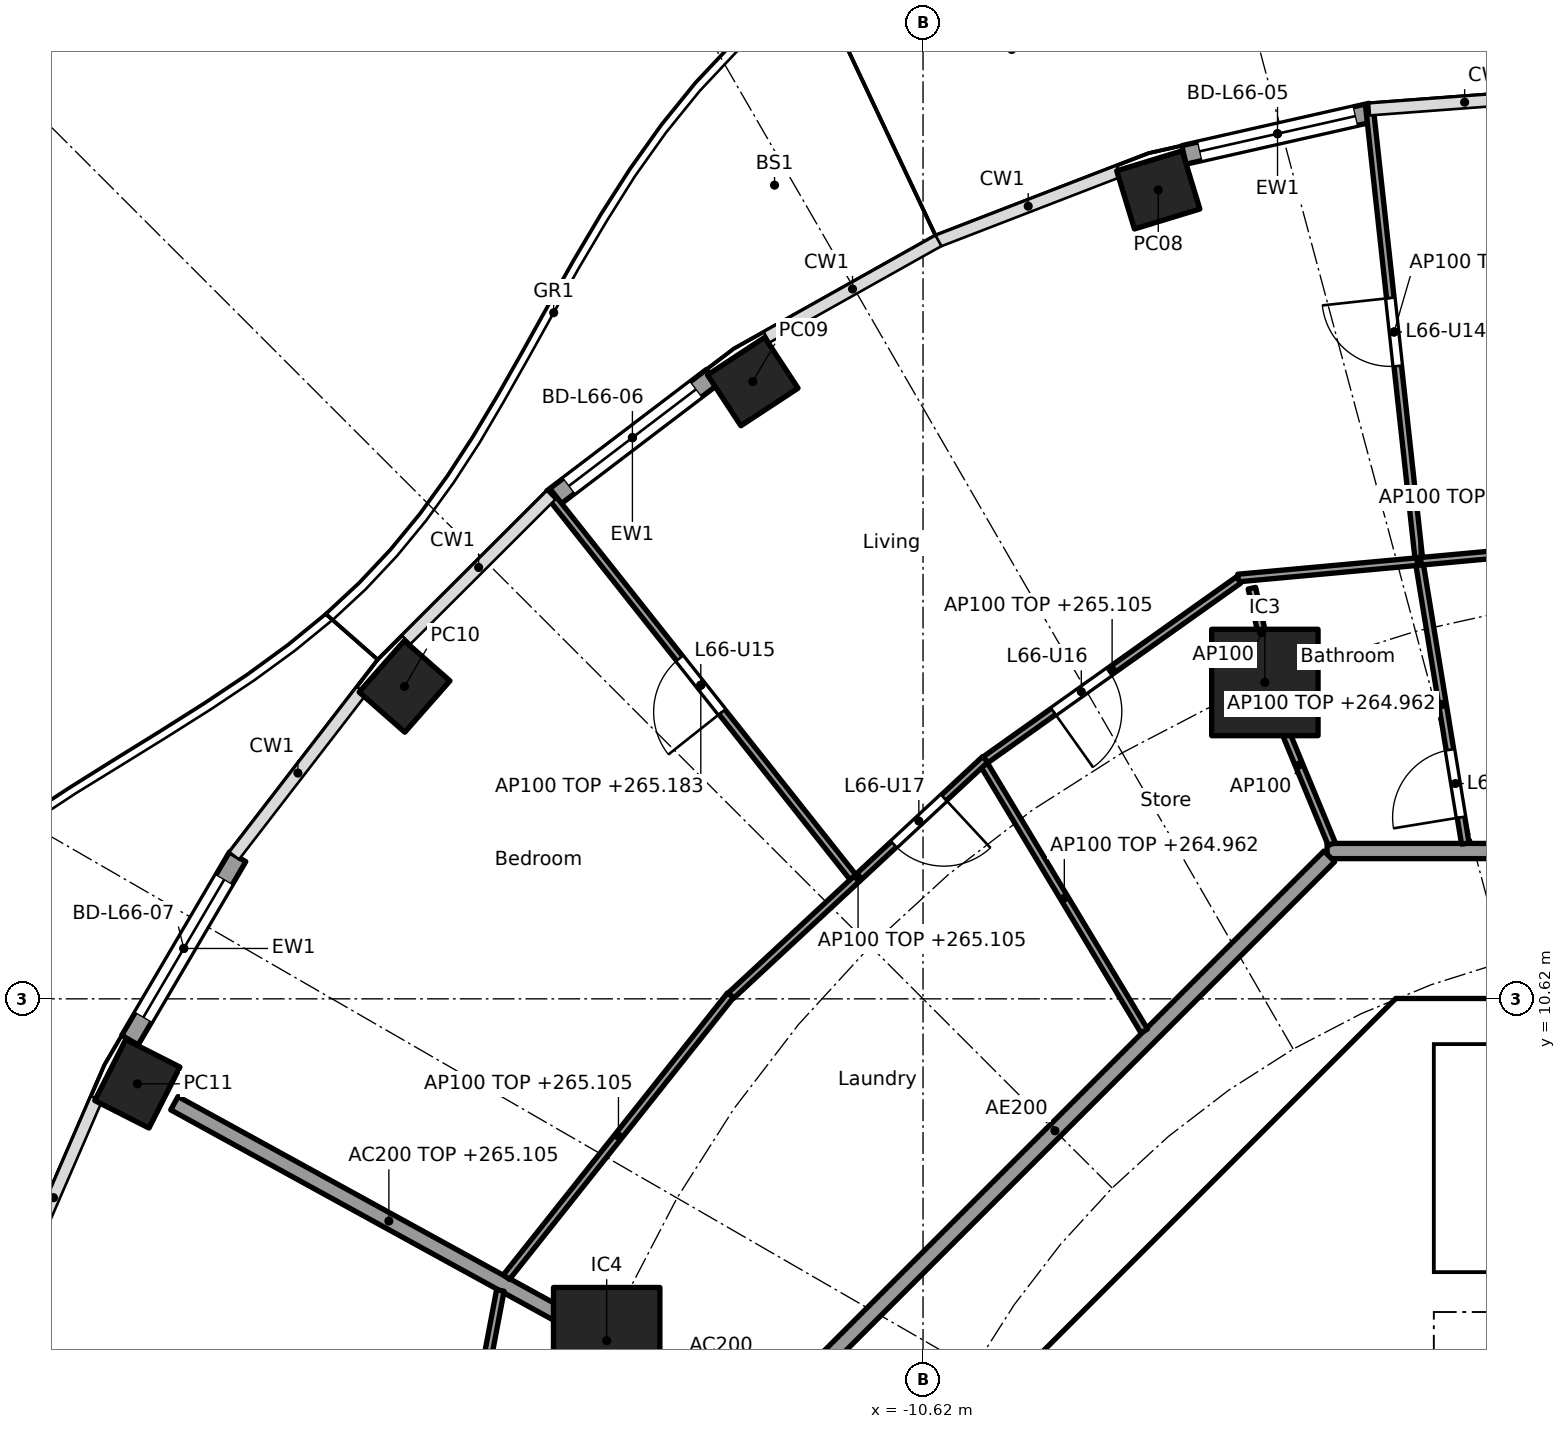
"""IFC4 building model, lengths in metres.
Left out: names, types, materials, properties, quantities, classifications, styles, units other than length and angle.
Written with IfcOpenShell. Run it as: python <this file> out.ifc"""

import sys

from ifc_helpers import new_model, si_unit, direction, frame, frame_2d, origin, origin_2d, place, context, subcontext, project, spatial, polyline, rectangle, hollow_rectangle, outline, extrude, element, fill, save


model = new_model("IFC4")
c1 = context("Model", 3, precision=1e-05, world=origin(), true_north=direction((0.0, 1.0)))
c2 = subcontext(c1, "Body", "Model", "MODEL_VIEW")
j1 = project(units=[si_unit("LENGTHUNIT", "METRE"), si_unit("PLANEANGLEUNIT", "RADIAN")], contexts=[c1])
p1 = place(None, origin())
s1 = spatial("IfcSite", under=j1, at=p1, CompositionType="ELEMENT")
p2 = place(p1, origin())
s2 = spatial("IfcBuilding", under=s1, at=p2, CompositionType="ELEMENT")
p3 = place(p2, frame((0.0, 0.0, 262.2)))
s3 = spatial("IfcBuildingStorey", under=s2, at=p3, CompositionType="ELEMENT", Elevation=262.2)
for number, where, z_axis, x_axis in (
    (1, (-7.525, 21.262, 0.0), (0.0, 0.0, 1.0), (-0.957, -0.292, 0.0)),
    (2, (-12.86, 18.741, 0.0), (0.0, 0.0, 1.0), (-0.836, -0.549, 0.0)),
    (3, (-17.441, 14.73, 0.0), (0.0, 0.0, 1.0), (-0.66, -0.751, 0.0)),
    (4, (-20.957, 9.502, 0.0), (0.0, 0.0, 1.0), (-0.452, -0.892, 0.0)),
):
    element("IfcColumn", number, at=place(p3, frame(where, z_axis=z_axis, x_axis=x_axis)), inside=s3, PredefinedType="COLUMN", context=c2, shape_type="SweptSolid", body=[
        extrude(hollow_rectangle(XDim=0.9, YDim=0.8, WallThickness=0.028, at=origin_2d()), origin(), (0.0, 0.0, 1.0), 3.7),
    ])
for number, where, z_axis, x_axis in (
    (5, (-6.123, 14.782, 0.0), (0.0, 0.0, 1.0), (1.0, 0.0, 0.0)),
    (6, (-14.782, 6.123, 0.0), (0.0, 0.0, 1.0), (1.0, 0.0, 0.0)),
):
    element("IfcColumn", number, at=place(p3, frame(where, z_axis=z_axis, x_axis=x_axis)), inside=s3, PredefinedType="COLUMN", context=c2, shape_type="SweptSolid", body=[
        extrude(rectangle(XDim=1.4, YDim=1.4, at=origin_2d()), origin(), (0.0, 0.0, 1.0), 3.7),
    ])
p4 = place(p3, frame((-7.188, 21.723, 0.0), z_axis=(0.0, 0.0, 1.0), x_axis=(0.975319584032, 0.220797891756, 0.0)))
e7 = element("IfcWall", 7, at=p4, inside=s3, PredefinedType="SOLIDWALL", context=c2, shape_type="SweptSolid", body=[
    extrude(rectangle(XDim=2.525, YDim=0.25, at=frame_2d((1.263, 0.0))), origin(), (0.0, 0.0, 1.0), 3.44),
])
p5 = place(p4, frame((0.213, 0.0, 0.0)))
e8 = element("IfcOpeningElement", 8, at=p5, cuts=e7, PredefinedType="OPENING", context=c2, shape_type="SweptSolid", body=[
    extrude(rectangle(XDim=2.1, YDim=2.4, at=frame_2d((1.05, 1.2))), frame((0.0, 0.135, 0.0), z_axis=(0.0, -1.0, 0.0), x_axis=(1.0, 0.0, 0.0)), (0.0, 0.0, 1.0), 0.27),
])
p6 = place(p3, frame((-15.495, 17.204, 0.0), z_axis=(0.0, 0.0, 1.0), x_axis=(0.796010739377, 0.605282498339, 0.0)))
e9 = element("IfcWall", 9, at=p6, inside=s3, PredefinedType="SOLIDWALL", context=c2, shape_type="SweptSolid", body=[
    extrude(rectangle(XDim=2.641, YDim=0.25, at=frame_2d((1.32, 0.0))), origin(), (0.0, 0.0, 1.0), 3.44),
])
p7 = place(p6, frame((0.27, 0.0, 0.0)))
e10 = element("IfcOpeningElement", 10, at=p7, cuts=e9, PredefinedType="OPENING", context=c2, shape_type="SweptSolid", body=[
    extrude(rectangle(XDim=2.1, YDim=2.4, at=frame_2d((1.05, 1.2))), frame((0.0, 0.135, 0.0), z_axis=(0.0, -1.0, 0.0), x_axis=(1.0, 0.0, 0.0)), (0.0, 0.0, 1.0), 0.27),
])
p8 = place(p3, frame((-21.054, 10.077, 0.0), z_axis=(0.0, 0.0, 1.0), x_axis=(0.506371364425, 0.862315511452, 0.0)))
e11 = element("IfcWall", 11, at=p8, inside=s3, PredefinedType="SOLIDWALL", context=c2, shape_type="SweptSolid", body=[
    extrude(rectangle(XDim=2.796, YDim=0.25, at=frame_2d((1.398, 0.0))), origin(), (0.0, 0.0, 1.0), 3.44),
])
p9 = place(p8, frame((0.348, 0.0, 0.0)))
e12 = element("IfcOpeningElement", 12, at=p9, cuts=e11, PredefinedType="OPENING", context=c2, shape_type="SweptSolid", body=[
    extrude(rectangle(XDim=2.1, YDim=2.4, at=frame_2d((1.05, 1.2))), frame((0.0, 0.135, 0.0), z_axis=(0.0, -1.0, 0.0), x_axis=(1.0, 0.0, 0.0)), (0.0, 0.0, 1.0), 0.27),
])
p10 = place(p3, frame((-4.613, 9.988, 0.0), z_axis=(0.0, 0.0, 1.0), x_axis=(-0.707106781187, -0.707106781187, 0.0)))
e13 = element("IfcWall", 13, at=p10, inside=s3, PredefinedType="SHEAR", context=c2, shape_type="SweptSolid", body=[
    extrude(rectangle(XDim=7.602, YDim=0.6, at=frame_2d((3.801, 0.0))), origin(), (0.0, 0.0, 1.0), 3.44),
])
p11 = place(p10, frame((0.351, 0.0, 0.0)))
e14 = element("IfcOpeningElement", 14, at=p11, cuts=e13, PredefinedType="OPENING", context=c2, shape_type="SweptSolid", body=[
    extrude(rectangle(XDim=1.1, YDim=2.1, at=frame_2d((0.55, 1.05))), frame((0.0, 0.31, 0.0), z_axis=(0.0, -1.0, 0.0), x_axis=(1.0, 0.0, 0.0)), (0.0, 0.0, 1.0), 0.62),
])
p12 = place(p3, frame((-5.8, 4.3, 0.0), z_axis=(0.0, 0.0, 1.0), x_axis=(0.0, 1.0, 0.0)))
e15 = element("IfcWall", 15, at=p12, inside=s3, PredefinedType="PARTITIONING", context=c2, shape_type="SweptSolid", body=[
    extrude(rectangle(XDim=3.927, YDim=0.15, at=frame_2d((1.963, 0.0))), origin(), (0.0, 0.0, 1.0), 3.44),
])
p13 = place(p12, frame((1.551, 0.0, 0.0)))
e16 = element("IfcOpeningElement", 16, at=p13, cuts=e15, PredefinedType="OPENING", context=c2, shape_type="SweptSolid", body=[
    extrude(rectangle(XDim=0.9, YDim=2.1, at=frame_2d((0.45, 1.05))), frame((0.0, 0.085, 0.0), z_axis=(0.0, -1.0, 0.0), x_axis=(1.0, 0.0, 0.0)), (0.0, 0.0, 1.0), 0.17),
])
p14 = place(p3, frame((-4.0, 4.3, 0.0), z_axis=(0.0, 0.0, 1.0), x_axis=(0.0, 1.0, 0.0)))
e17 = element("IfcWall", 17, at=p14, inside=s3, PredefinedType="SOLIDWALL", context=c2, shape_type="SweptSolid", body=[
    extrude(rectangle(XDim=2.2, YDim=0.2, at=frame_2d((1.1, 0.0))), origin(), (0.0, 0.0, 1.0), 3.44),
])
p15 = place(p14, frame((0.55, 0.0, 0.0)))
e18 = element("IfcOpeningElement", 18, at=p15, cuts=e17, PredefinedType="OPENING", context=c2, shape_type="SweptSolid", body=[
    extrude(rectangle(XDim=1.1, YDim=2.1, at=frame_2d((0.55, 1.05))), frame((0.0, 0.11, 0.0), z_axis=(0.0, -1.0, 0.0), x_axis=(1.0, 0.0, 0.0)), (0.0, 0.0, 1.0), 0.22),
])
p16 = place(p3, origin())
e19 = element("IfcWall", 19, at=p16, inside=s3, PredefinedType="SHEAR", context=c2, shape_type="SweptSolid", body=[
    extrude(outline(polyline([(-4.152, 10.025), (-4.401, 9.776), (-4.825, 10.2), (-4.401, 10.625), (4.401, 10.625), (4.825, 10.2), (4.401, 9.776), (4.152, 10.025), (-4.152, 10.025)])), origin(), (0.0, 0.0, 1.0), 3.44),
])
p17 = place(p3, origin())
e20 = element("IfcWall", 20, at=p17, inside=s3, PredefinedType="SOLIDWALL", context=c2, shape_type="SweptSolid", body=[
    extrude(outline(polyline([(-3.9, 7.025), (-4.1, 7.025), (-4.1, 10.025), (-3.9, 10.025), (-3.9, 7.025)])), origin(), (0.0, 0.0, 1.0), 3.44),
])
p18 = place(p3, origin())
e21 = element("IfcWall", 21, at=p18, inside=s3, PredefinedType="SOLIDWALL", context=c2, shape_type="SweptSolid", body=[
    extrude(outline(polyline([(4.1, 6.5), (-4.1, 6.5), (-4.1, 7.025), (4.1, 7.025), (4.1, 6.5)])), origin(), (0.0, 0.0, 1.0), 3.44),
])
p19 = place(p3, frame((-12.657, 5.243, 0.0), z_axis=(0.0, 0.0, 1.0), x_axis=(-0.923869415315, 0.382707856524, 0.0)))
e22 = element("IfcWall", 22, at=p19, inside=s3, PredefinedType="PARTITIONING", context=c2, shape_type="SweptSolid", body=[
    extrude(rectangle(XDim=2.2, YDim=0.2, at=frame_2d((1.1, 0.0))), origin(), (0.0, 0.0, 1.0), 3.44),
])
p20 = place(p3, frame((-14.826, 6.147, 0.0), z_axis=(0.0, 0.0, 1.0), x_axis=(-0.876484755865, 0.481429613481, 0.0)))
e23 = element("IfcWall", 23, at=p20, inside=s3, PredefinedType="PARTITIONING", context=c2, shape_type="SweptSolid", body=[
    extrude(rectangle(XDim=6.439, YDim=0.2, at=frame_2d((3.219, 0.0))), origin(), (0.0, 0.0, 1.0), 2.905),
])
p21 = place(p3, frame((5.104, 12.565, 0.0), z_axis=(0.0, 0.0, 1.0), x_axis=(-1.0, 0.0, 0.0)))
e24 = element("IfcWall", 24, at=p21, inside=s3, PredefinedType="PARTITIONING", context=c2, shape_type="SweptSolid", body=[
    extrude(rectangle(XDim=10.409, YDim=0.2, at=frame_2d((5.205, 0.0))), origin(), (0.0, 0.0, 1.0), 3.44),
])
p22 = place(p21, frame((6.339, 0.0, 0.0)))
e25 = element("IfcOpeningElement", 25, at=p22, cuts=e24, PredefinedType="OPENING", context=c2, shape_type="SweptSolid", body=[
    extrude(rectangle(XDim=1.0, YDim=2.1, at=frame_2d((0.5, 1.05))), frame((0.0, 0.11, 0.0), z_axis=(0.0, -1.0, 0.0), x_axis=(1.0, 0.0, 0.0)), (0.0, 0.0, 1.0), 0.22),
])
p23 = place(p3, frame((-5.275, 12.494, 0.0), z_axis=(0.0, 0.0, 1.0), x_axis=(-0.707106781187, -0.707106781187, 0.0)))
e26 = element("IfcWall", 26, at=p23, inside=s3, PredefinedType="PARTITIONING", context=c2, shape_type="SweptSolid", body=[
    extrude(rectangle(XDim=10.209, YDim=0.2, at=frame_2d((5.104, 0.0))), origin(), (0.0, 0.0, 1.0), 3.44),
])
p24 = place(p3, frame((-1.711, 16.592, 0.0), z_axis=(0.0, 0.0, 1.0), x_axis=(-0.995843707015, -0.091078599017, 0.0)))
e27 = element("IfcWall", 27, at=p24, inside=s3, PredefinedType="PARTITIONING", context=c2, shape_type="SweptSolid", body=[
    extrude(rectangle(XDim=4.785, YDim=0.1, at=frame_2d((2.392, 0.0))), origin(), (0.0, 0.0, 1.0), 2.905),
])
p25 = place(p3, frame((-3.486, 12.663, 0.0), z_axis=(0.0, 0.0, 1.0), x_axis=(-0.161602751674, 0.986855891532, 0.0)))
e28 = element("IfcWall", 28, at=p25, inside=s3, PredefinedType="PARTITIONING", context=c2, shape_type="SweptSolid", body=[
    extrude(rectangle(XDim=3.71, YDim=0.1, at=frame_2d((1.855, 0.0))), origin(), (0.0, 0.0, 1.0), 2.762),
])
p26 = place(p25, frame((0.35, 0.0, 0.0)))
e29 = element("IfcOpeningElement", 29, at=p26, cuts=e28, PredefinedType="OPENING", context=c2, shape_type="SweptSolid", body=[
    extrude(rectangle(XDim=0.9, YDim=2.1, at=frame_2d((0.45, 1.05))), frame((0.0, 0.06, 0.0), z_axis=(0.0, -1.0, 0.0), x_axis=(1.0, 0.0, 0.0)), (0.0, 0.0, 1.0), 0.12),
])
p27 = place(p3, frame((-4.099, 16.424, 0.0), z_axis=(0.0, 0.0, 1.0), x_axis=(-0.10867295252, 0.99407755703, 0.0)))
e30 = element("IfcWall", 30, at=p27, inside=s3, PredefinedType="PARTITIONING", context=c2, shape_type="SweptSolid", body=[
    extrude(rectangle(XDim=5.974, YDim=0.1, at=frame_2d((2.987, 0.0))), origin(), (0.0, 0.0, 1.0), 2.983),
])
p28 = place(p27, frame((2.537, 0.0, 0.0)))
e31 = element("IfcOpeningElement", 31, at=p28, cuts=e30, PredefinedType="OPENING", context=c2, shape_type="SweptSolid", body=[
    extrude(rectangle(XDim=0.9, YDim=2.1, at=frame_2d((0.45, 1.05))), frame((0.0, 0.06, 0.0), z_axis=(0.0, -1.0, 0.0), x_axis=(1.0, 0.0, 0.0)), (0.0, 0.0, 1.0), 0.12),
])
p29 = place(p3, frame((-5.243, 12.657, 0.0), z_axis=(0.0, 0.0, 1.0), x_axis=(-0.382719158442, 0.923864733477, 0.0)))
e32 = element("IfcWall", 32, at=p29, inside=s3, PredefinedType="PARTITIONING", context=c2, shape_type="SweptSolid", body=[
    extrude(rectangle(XDim=2.25, YDim=0.1, at=frame_2d((1.125, 0.0))), origin(), (0.0, 0.0, 1.0), 3.44),
])
p30 = place(p3, frame((-6.467, 16.132, 0.0), z_axis=(0.0, 0.0, 1.0), x_axis=(-0.815192286069, -0.579190414919, 0.0)))
e33 = element("IfcWall", 33, at=p30, inside=s3, PredefinedType="PARTITIONING", context=c2, shape_type="SweptSolid", body=[
    extrude(rectangle(XDim=4.086, YDim=0.1, at=frame_2d((2.043, 0.0))), origin(), (0.0, 0.0, 1.0), 2.905),
])
p31 = place(p30, frame((2.09, 0.0, 0.0)))
e34 = element("IfcOpeningElement", 34, at=p31, cuts=e33, PredefinedType="OPENING", context=c2, shape_type="SweptSolid", body=[
    extrude(rectangle(XDim=0.9, YDim=2.1, at=frame_2d((0.45, 1.05))), frame((0.0, 0.06, 0.0), z_axis=(0.0, -1.0, 0.0), x_axis=(1.0, 0.0, 0.0)), (0.0, 0.0, 1.0), 0.12),
])
p32 = place(p3, frame((-7.709, 10.197, 0.0), z_axis=(0.0, 0.0, 1.0), x_axis=(-0.515524871668, 0.856874615502, 0.0)))
e35 = element("IfcWall", 35, at=p32, inside=s3, PredefinedType="PARTITIONING", context=c2, shape_type="SweptSolid", body=[
    extrude(rectangle(XDim=4.08, YDim=0.1, at=frame_2d((2.04, 0.0))), origin(), (0.0, 0.0, 1.0), 2.762),
])
p33 = place(p3, frame((-9.802, 13.77, 0.0), z_axis=(0.0, 0.0, 1.0), x_axis=(-0.732662099478, -0.680592571212, 0.0)))
e36 = element("IfcWall", 36, at=p33, inside=s3, PredefinedType="PARTITIONING", context=c2, shape_type="SweptSolid", body=[
    extrude(rectangle(XDim=4.567, YDim=0.1, at=frame_2d((2.283, 0.0))), origin(), (0.0, 0.0, 1.0), 2.905),
])
p34 = place(p33, frame((0.742, 0.0, 0.0)))
e37 = element("IfcOpeningElement", 37, at=p34, cuts=e36, PredefinedType="OPENING", context=c2, shape_type="SweptSolid", body=[
    extrude(rectangle(XDim=0.9, YDim=2.1, at=frame_2d((0.45, 1.05))), frame((0.0, 0.06, 0.0), z_axis=(0.0, -1.0, 0.0), x_axis=(1.0, 0.0, 0.0)), (0.0, 0.0, 1.0), 0.12),
])
p35 = place(p3, frame((-11.543, 12.221, 0.0), z_axis=(0.0, 0.0, 1.0), x_axis=(-0.621117202271, 0.783717692185, 0.0)))
e38 = element("IfcWall", 38, at=p35, inside=s3, PredefinedType="PARTITIONING", context=c2, shape_type="SweptSolid", body=[
    extrude(rectangle(XDim=6.444, YDim=0.1, at=frame_2d((3.222, 0.0))), origin(), (0.0, 0.0, 1.0), 2.983),
])
p36 = place(p35, frame((2.772, 0.0, 0.0)))
e39 = element("IfcOpeningElement", 39, at=p36, cuts=e38, PredefinedType="OPENING", context=c2, shape_type="SweptSolid", body=[
    extrude(rectangle(XDim=0.9, YDim=2.1, at=frame_2d((0.45, 1.05))), frame((0.0, 0.06, 0.0), z_axis=(0.0, -1.0, 0.0), x_axis=(1.0, 0.0, 0.0)), (0.0, 0.0, 1.0), 0.12),
])
p37 = place(p3, frame((-13.154, 10.667, 0.0), z_axis=(0.0, 0.0, 1.0), x_axis=(-0.622246555556, -0.782821323227, 0.0)))
e40 = element("IfcWall", 40, at=p37, inside=s3, PredefinedType="PARTITIONING", context=c2, shape_type="SweptSolid", body=[
    extrude(rectangle(XDim=4.736, YDim=0.1, at=frame_2d((2.368, 0.0))), origin(), (0.0, 0.0, 1.0), 2.905),
])
p38 = place(p3, frame((-16.181, 6.783, 0.0), z_axis=(0.0, 0.0, 1.0), x_axis=(-0.185670583745, -0.982612046706, 0.0)))
e41 = element("IfcWall", 41, at=p38, inside=s3, PredefinedType="PARTITIONING", context=c2, shape_type="SweptSolid", body=[
    extrude(rectangle(XDim=4.351, YDim=0.1, at=frame_2d((2.176, 0.0))), origin(), (0.0, 0.0, 1.0), 2.905),
])
p39 = place(p38, frame((1.726, 0.0, 0.0)))
e42 = element("IfcOpeningElement", 42, at=p39, cuts=e41, PredefinedType="OPENING", context=c2, shape_type="SweptSolid", body=[
    extrude(rectangle(XDim=0.9, YDim=2.1, at=frame_2d((0.45, 1.05))), frame((0.0, 0.06, 0.0), z_axis=(0.0, -1.0, 0.0), x_axis=(1.0, 0.0, 0.0)), (0.0, 0.0, 1.0), 0.12),
])
p40 = place(p3, frame((-6.036, 14.853, 0.0), z_axis=(0.0, 0.0, 1.0), x_axis=(-0.215009518078, 0.976611953202, 0.0)))
e43 = element("IfcWall", 43, at=p40, inside=s3, PredefinedType="PARTITIONING", context=c2, shape_type="SweptSolid", body=[
    extrude(rectangle(XDim=1.198, YDim=0.1, at=frame_2d((0.599, 0.0))), origin(), (0.0, 0.0, 1.0), 3.44),
])
p41 = place(p5, origin())
e44 = element("IfcDoor", 44, at=p41, inside=s3, OperationType="SLIDING_TO_LEFT", PredefinedType="DOOR", context=c2, shape_type="SweptSolid", body=[
    extrude(rectangle(XDim=2.1, YDim=2.4, at=frame_2d((1.05, 1.2))), frame((0.0, 0.025, 0.0), z_axis=(0.0, -1.0, 0.0), x_axis=(1.0, 0.0, 0.0)), (0.0, 0.0, 1.0), 0.05),
])
fill(e8, e44)
p42 = place(p7, origin())
e45 = element("IfcDoor", 45, at=p42, inside=s3, OperationType="SLIDING_TO_LEFT", PredefinedType="DOOR", context=c2, shape_type="SweptSolid", body=[
    extrude(rectangle(XDim=2.1, YDim=2.4, at=frame_2d((1.05, 1.2))), frame((0.0, 0.025, 0.0), z_axis=(0.0, -1.0, 0.0), x_axis=(1.0, 0.0, 0.0)), (0.0, 0.0, 1.0), 0.05),
])
fill(e10, e45)
p43 = place(p9, origin())
e46 = element("IfcDoor", 46, at=p43, inside=s3, OperationType="SLIDING_TO_LEFT", PredefinedType="DOOR", context=c2, shape_type="SweptSolid", body=[
    extrude(rectangle(XDim=2.1, YDim=2.4, at=frame_2d((1.05, 1.2))), frame((0.0, 0.025, 0.0), z_axis=(0.0, -1.0, 0.0), x_axis=(1.0, 0.0, 0.0)), (0.0, 0.0, 1.0), 0.05),
])
fill(e12, e46)
p44 = place(p13, origin())
e47 = element("IfcDoor", 47, at=p44, inside=s3, OperationType="SINGLE_SWING_LEFT", PredefinedType="DOOR", context=c2, shape_type="SweptSolid", body=[
    extrude(rectangle(XDim=0.9, YDim=2.1, at=frame_2d((0.45, 1.05))), frame((0.0, 0.025, 0.0), z_axis=(0.0, -1.0, 0.0), x_axis=(1.0, 0.0, 0.0)), (0.0, 0.0, 1.0), 0.05),
])
fill(e16, e47)
p45 = place(p11, origin())
e48 = element("IfcDoor", 48, at=p45, inside=s3, OperationType="SINGLE_SWING_RIGHT", PredefinedType="DOOR", context=c2, shape_type="SweptSolid", body=[
    extrude(rectangle(XDim=1.1, YDim=2.1, at=frame_2d((0.55, 1.05))), frame((0.0, 0.025, 0.0), z_axis=(0.0, -1.0, 0.0), x_axis=(1.0, 0.0, 0.0)), (0.0, 0.0, 1.0), 0.05),
])
fill(e14, e48)
p46 = place(p26, origin())
e49 = element("IfcDoor", 49, at=p46, inside=s3, OperationType="SINGLE_SWING_LEFT", PredefinedType="DOOR", context=c2, shape_type="SweptSolid", body=[
    extrude(rectangle(XDim=0.9, YDim=2.1, at=frame_2d((0.45, 1.05))), frame((0.0, 0.025, 0.0), z_axis=(0.0, -1.0, 0.0), x_axis=(1.0, 0.0, 0.0)), (0.0, 0.0, 1.0), 0.05),
])
fill(e29, e49)
p47 = place(p28, origin())
e50 = element("IfcDoor", 50, at=p47, inside=s3, OperationType="SINGLE_SWING_RIGHT", PredefinedType="DOOR", context=c2, shape_type="SweptSolid", body=[
    extrude(rectangle(XDim=0.9, YDim=2.1, at=frame_2d((0.45, 1.05))), frame((0.0, 0.025, 0.0), z_axis=(0.0, -1.0, 0.0), x_axis=(1.0, 0.0, 0.0)), (0.0, 0.0, 1.0), 0.05),
])
fill(e31, e50)
p48 = place(p36, origin())
e51 = element("IfcDoor", 51, at=p48, inside=s3, OperationType="SINGLE_SWING_LEFT", PredefinedType="DOOR", context=c2, shape_type="SweptSolid", body=[
    extrude(rectangle(XDim=0.9, YDim=2.1, at=frame_2d((0.45, 1.05))), frame((0.0, 0.025, 0.0), z_axis=(0.0, -1.0, 0.0), x_axis=(1.0, 0.0, 0.0)), (0.0, 0.0, 1.0), 0.05),
])
fill(e39, e51)
p49 = place(p31, origin())
e52 = element("IfcDoor", 52, at=p49, inside=s3, OperationType="SINGLE_SWING_RIGHT", PredefinedType="DOOR", context=c2, shape_type="SweptSolid", body=[
    extrude(rectangle(XDim=0.9, YDim=2.1, at=frame_2d((0.45, 1.05))), frame((0.0, 0.025, 0.0), z_axis=(0.0, -1.0, 0.0), x_axis=(1.0, 0.0, 0.0)), (0.0, 0.0, 1.0), 0.05),
])
fill(e34, e52)
p50 = place(p34, origin())
e53 = element("IfcDoor", 53, at=p50, inside=s3, OperationType="SINGLE_SWING_LEFT", PredefinedType="DOOR", context=c2, shape_type="SweptSolid", body=[
    extrude(rectangle(XDim=0.9, YDim=2.1, at=frame_2d((0.45, 1.05))), frame((0.0, 0.025, 0.0), z_axis=(0.0, -1.0, 0.0), x_axis=(1.0, 0.0, 0.0)), (0.0, 0.0, 1.0), 0.05),
])
fill(e37, e53)
save(model, sys.argv[1])
